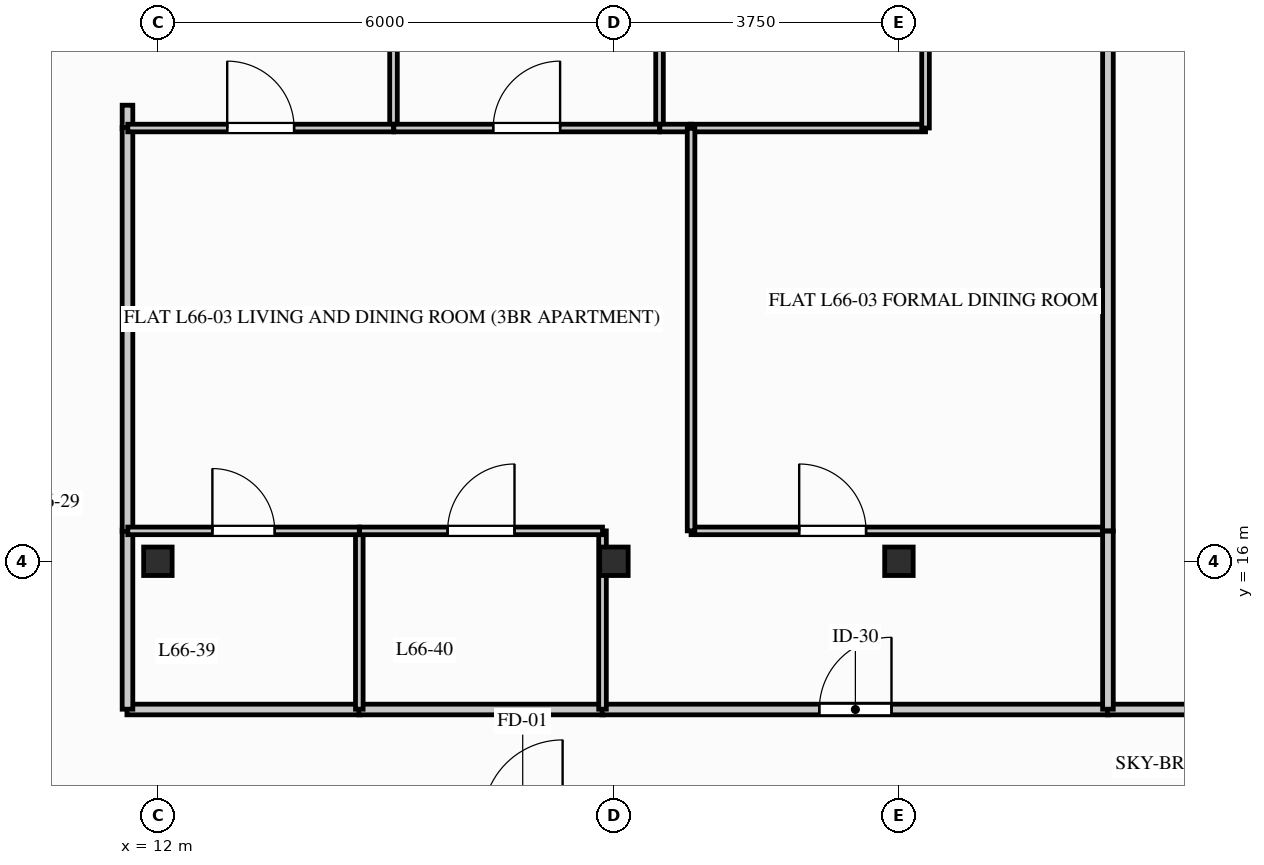
"""IFC4 building model, lengths in metres.
Left out: names, types, materials, properties, quantities, classifications, styles, units other than length and angle.
Written with IfcOpenShell. Run it as: python <this file> out.ifc"""

import sys

from ifc_helpers import new_model, si_unit, direction, frame, frame_2d, origin, origin_2d, place, context, subcontext, project, spatial, rectangle, i_section, extrude, element, fill, save


model = new_model("IFC4")
c1 = context("Model", 3, precision=1e-05, world=origin(), true_north=direction((0.0, 1.0)))
c2 = subcontext(c1, "Body", "Model", "MODEL_VIEW")
j1 = project(units=[si_unit("LENGTHUNIT", "METRE"), si_unit("PLANEANGLEUNIT", "RADIAN")], contexts=[c1])
p1 = place(None, origin())
s1 = spatial("IfcSite", under=j1, at=p1, CompositionType="ELEMENT")
p2 = place(p1, origin())
s2 = spatial("IfcBuilding", under=s1, at=p2, CompositionType="ELEMENT")
p3 = place(p2, frame((0.0, 0.0, 218.0)))
s3 = spatial("IfcBuildingStorey", under=s2, at=p3, CompositionType="ELEMENT", Elevation=218.0)
for number, where, z_axis, x_axis in (
    (1, (12.0, 16.0, 0.0), (0.0, 0.0, 1.0), (1.0, 0.0, 0.0)),
    (2, (18.0, 16.0, 0.0), (0.0, 0.0, 1.0), (1.0, 0.0, 0.0)),
    (3, (21.75, 16.0, 0.0), (0.0, 0.0, 1.0), (1.0, 0.0, 0.0)),
):
    element("IfcColumn", number, at=place(p3, frame(where, z_axis=z_axis, x_axis=x_axis)), inside=s3, PredefinedType="COLUMN", context=c2, shape_type="SweptSolid", body=[
        extrude(i_section(OverallWidth=0.375, OverallDepth=0.375, WebThickness=0.017, FlangeThickness=0.027, FilletRadius=0.015, at=origin_2d()), origin(), (0.0, 0.0, 1.0), 3.1),
    ])
p4 = place(p3, frame((11.593, 14.05, 0.0), z_axis=(0.0, 0.0, 1.0), x_axis=(1.0, 0.0, 0.0)))
e4 = element("IfcWall", 4, at=p4, inside=s3, PredefinedType="PARTITIONING", context=c2, shape_type="SweptSolid", body=[
    extrude(rectangle(XDim=3.069, YDim=0.14, at=frame_2d((1.534, 0.0))), origin(), (0.0, 0.0, 1.0), 2.325),
])
p5 = place(p3, frame((14.643, 14.05, 0.0), z_axis=(0.0, 0.0, 1.0), x_axis=(1.0, 0.0, 0.0)))
e5 = element("IfcWall", 5, at=p5, inside=s3, PredefinedType="PARTITIONING", context=c2, shape_type="SweptSolid", body=[
    extrude(rectangle(XDim=3.219, YDim=0.14, at=frame_2d((1.609, 0.0))), origin(), (0.0, 0.0, 1.0), 2.89),
])
p6 = place(p3, frame((17.843, 14.05, 0.0), z_axis=(0.0, 0.0, 1.0), x_axis=(1.0, 0.0, 0.0)))
e6 = element("IfcWall", 6, at=p6, inside=s3, PredefinedType="PARTITIONING", context=c2, shape_type="SweptSolid", body=[
    extrude(rectangle(XDim=6.668, YDim=0.14, at=frame_2d((3.334, 0.0))), origin(), (0.0, 0.0, 1.0), 2.325),
])
p7 = place(p6, frame((2.859, 0.0, 0.0)))
e7 = element("IfcOpeningElement", 7, at=p7, cuts=e6, PredefinedType="OPENING", context=c2, shape_type="SweptSolid", body=[
    extrude(rectangle(XDim=0.95, YDim=2.05, at=frame_2d((0.475, 1.025))), frame((0.0, 0.08, 0.0), z_axis=(0.0, -1.0, 0.0), x_axis=(1.0, 0.0, 0.0)), (0.0, 0.0, 1.0), 0.16),
])
p8 = place(p3, frame((24.493, 14.05, 0.0), z_axis=(0.0, 0.0, 1.0), x_axis=(1.0, 0.0, 0.0)))
e8 = element("IfcWall", 8, at=p8, inside=s3, PredefinedType="PARTITIONING", context=c2, shape_type="SweptSolid", body=[
    extrude(rectangle(XDim=11.019, YDim=0.14, at=frame_2d((5.509, 0.0))), origin(), (0.0, 0.0, 1.0), 2.332),
])
p9 = place(p8, frame((4.984, 0.0, 0.0)))
e9 = element("IfcOpeningElement", 9, at=p9, cuts=e8, PredefinedType="OPENING", context=c2, shape_type="SweptSolid", body=[
    extrude(rectangle(XDim=1.05, YDim=2.06, at=frame_2d((0.525, 1.03))), frame((0.0, 0.08, 0.0), z_axis=(0.0, -1.0, 0.0), x_axis=(1.0, 0.0, 0.0)), (0.0, 0.0, 1.0), 0.16),
])
p10 = place(p3, frame((11.6, 14.054, 0.0), z_axis=(0.0, 0.0, 1.0), x_axis=(0.0, 1.0, 0.0)))
e10 = element("IfcWall", 10, at=p10, inside=s3, PredefinedType="PARTITIONING", context=c2, shape_type="SweptSolid", body=[
    extrude(rectangle(XDim=2.357, YDim=0.14, at=frame_2d((1.179, 0.0))), origin(), (0.0, 0.0, 1.0), 2.325),
])
p11 = place(p3, frame((11.6, 21.689, 0.0), z_axis=(0.0, 0.0, 1.0), x_axis=(0.0, 1.0, 0.0)))
e11 = element("IfcWall", 11, at=p11, inside=s3, PredefinedType="PARTITIONING", context=c2, shape_type="SweptSolid", body=[
    extrude(rectangle(XDim=0.311, YDim=0.14, at=frame_2d((0.156, 0.0))), origin(), (0.0, 0.0, 1.0), 2.89),
])
p12 = place(p3, frame((11.6, 16.393, 0.0), z_axis=(0.0, 0.0, 1.0), x_axis=(0.0, 1.0, 0.0)))
e12 = element("IfcWall", 12, at=p12, inside=s3, PredefinedType="PARTITIONING", context=c2, shape_type="SweptSolid", body=[
    extrude(rectangle(XDim=5.315, YDim=0.14, at=frame_2d((2.657, 0.0))), origin(), (0.0, 0.0, 1.0), 2.614),
])
p13 = place(p3, frame((14.65, 14.054, 0.0), z_axis=(0.0, 0.0, 1.0), x_axis=(0.0, 1.0, 0.0)))
e13 = element("IfcWall", 13, at=p13, inside=s3, PredefinedType="PARTITIONING", context=c2, shape_type="SweptSolid", body=[
    extrude(rectangle(XDim=2.346, YDim=0.1, at=frame_2d((1.173, 0.0))), origin(), (0.0, 0.0, 1.0), 2.325),
])
p14 = place(p3, frame((11.604, 16.4, 0.0), z_axis=(0.0, 0.0, 1.0), x_axis=(1.0, 0.0, 0.0)))
e14 = element("IfcWall", 14, at=p14, inside=s3, PredefinedType="PARTITIONING", context=c2, shape_type="SweptSolid", body=[
    extrude(rectangle(XDim=3.046, YDim=0.1, at=frame_2d((1.523, 0.0))), origin(), (0.0, 0.0, 1.0), 2.325),
])
p15 = place(p14, frame((1.113, 0.0, 0.0)))
e15 = element("IfcOpeningElement", 15, at=p15, cuts=e14, PredefinedType="OPENING", context=c2, shape_type="SweptSolid", body=[
    extrude(rectangle(XDim=0.82, YDim=2.02, at=frame_2d((0.41, 1.01))), frame((0.0, 0.06, 0.0), z_axis=(0.0, -1.0, 0.0), x_axis=(1.0, 0.0, 0.0)), (0.0, 0.0, 1.0), 0.12),
])
p16 = place(p3, frame((17.85, 14.054, 0.0), z_axis=(0.0, 0.0, 1.0), x_axis=(0.0, 1.0, 0.0)))
e16 = element("IfcWall", 16, at=p16, inside=s3, PredefinedType="PARTITIONING", context=c2, shape_type="SweptSolid", body=[
    extrude(rectangle(XDim=2.346, YDim=0.1, at=frame_2d((1.173, 0.0))), origin(), (0.0, 0.0, 1.0), 2.325),
])
p17 = place(p3, frame((14.654, 16.4, 0.0), z_axis=(0.0, 0.0, 1.0), x_axis=(1.0, 0.0, 0.0)))
e17 = element("IfcWall", 17, at=p17, inside=s3, PredefinedType="PARTITIONING", context=c2, shape_type="SweptSolid", body=[
    extrude(rectangle(XDim=3.196, YDim=0.1, at=frame_2d((1.598, 0.0))), origin(), (0.0, 0.0, 1.0), 2.89),
])
p18 = place(p17, frame((1.158, 0.0, 0.0)))
e18 = element("IfcOpeningElement", 18, at=p18, cuts=e17, PredefinedType="OPENING", context=c2, shape_type="SweptSolid", body=[
    extrude(rectangle(XDim=0.88, YDim=2.04, at=frame_2d((0.44, 1.02))), frame((0.0, 0.06, 0.0), z_axis=(0.0, -1.0, 0.0), x_axis=(1.0, 0.0, 0.0)), (0.0, 0.0, 1.0), 0.12),
])
p19 = place(p3, frame((15.1, 21.7, 0.0), z_axis=(0.0, 0.0, 1.0), x_axis=(0.0, 1.0, 0.0)))
e19 = element("IfcWall", 19, at=p19, inside=s3, PredefinedType="PARTITIONING", context=c2, shape_type="SweptSolid", body=[
    extrude(rectangle(XDim=4.6, YDim=0.1, at=frame_2d((2.3, 0.0))), origin(), (0.0, 0.0, 1.0), 2.325),
])
p20 = place(p3, frame((11.604, 21.7, 0.0), z_axis=(0.0, 0.0, 1.0), x_axis=(1.0, 0.0, 0.0)))
e20 = element("IfcWall", 20, at=p20, inside=s3, PredefinedType="PARTITIONING", context=c2, shape_type="SweptSolid", body=[
    extrude(rectangle(XDim=3.496, YDim=0.1, at=frame_2d((1.748, 0.0))), origin(), (0.0, 0.0, 1.0), 2.325),
])
p21 = place(p20, frame((1.308, 0.0, 0.0)))
e21 = element("IfcOpeningElement", 21, at=p21, cuts=e20, PredefinedType="OPENING", context=c2, shape_type="SweptSolid", body=[
    extrude(rectangle(XDim=0.88, YDim=2.04, at=frame_2d((0.44, 1.02))), frame((0.0, 0.06, 0.0), z_axis=(0.0, -1.0, 0.0), x_axis=(1.0, 0.0, 0.0)), (0.0, 0.0, 1.0), 0.12),
])
p22 = place(p3, frame((18.6, 21.7, 0.0), z_axis=(0.0, 0.0, 1.0), x_axis=(0.0, 1.0, 0.0)))
e22 = element("IfcWall", 22, at=p22, inside=s3, PredefinedType="PARTITIONING", context=c2, shape_type="SweptSolid", body=[
    extrude(rectangle(XDim=4.6, YDim=0.1, at=frame_2d((2.3, 0.0))), origin(), (0.0, 0.0, 1.0), 2.325),
])
p23 = place(p22, frame((2.33, 0.0, 0.0)))
e23 = element("IfcOpeningElement", 23, at=p23, cuts=e22, PredefinedType="OPENING", context=c2, shape_type="SweptSolid", body=[
    extrude(rectangle(XDim=0.82, YDim=2.02, at=frame_2d((0.41, 1.01))), frame((0.0, 0.06, 0.0), z_axis=(0.0, -1.0, 0.0), x_axis=(1.0, 0.0, 0.0)), (0.0, 0.0, 1.0), 0.12),
])
p24 = place(p3, frame((15.104, 21.7, 0.0), z_axis=(0.0, 0.0, 1.0), x_axis=(1.0, 0.0, 0.0)))
e24 = element("IfcWall", 24, at=p24, inside=s3, PredefinedType="PARTITIONING", context=c2, shape_type="SweptSolid", body=[
    extrude(rectangle(XDim=3.496, YDim=0.1, at=frame_2d((1.748, 0.0))), origin(), (0.0, 0.0, 1.0), 2.325),
])
p25 = place(p24, frame((1.308, 0.0, 0.0)))
e25 = element("IfcOpeningElement", 25, at=p25, cuts=e24, PredefinedType="OPENING", context=c2, shape_type="SweptSolid", body=[
    extrude(rectangle(XDim=0.88, YDim=2.04, at=frame_2d((0.44, 1.02))), frame((0.0, 0.06, 0.0), z_axis=(0.0, -1.0, 0.0), x_axis=(1.0, 0.0, 0.0)), (0.0, 0.0, 1.0), 0.12),
])
p26 = place(p3, frame((19.004, 21.7, 0.0), z_axis=(0.0, 0.0, 1.0), x_axis=(1.0, 0.0, 0.0)))
e26 = element("IfcWall", 26, at=p26, inside=s3, PredefinedType="PARTITIONING", context=c2, shape_type="SweptSolid", body=[
    extrude(rectangle(XDim=3.096, YDim=0.1, at=frame_2d((1.548, 0.0))), origin(), (0.0, 0.0, 1.0), 2.325),
])
p27 = place(p3, frame((22.1, 21.7, 0.0), z_axis=(0.0, 0.0, 1.0), x_axis=(0.0, 1.0, 0.0)))
e27 = element("IfcWall", 27, at=p27, inside=s3, PredefinedType="PARTITIONING", context=c2, shape_type="SweptSolid", body=[
    extrude(rectangle(XDim=4.6, YDim=0.1, at=frame_2d((2.3, 0.0))), origin(), (0.0, 0.0, 1.0), 2.325),
])
p28 = place(p3, frame((18.604, 21.7, 0.0), z_axis=(0.0, 0.0, 1.0), x_axis=(1.0, 0.0, 0.0)))
e28 = element("IfcWall", 28, at=p28, inside=s3, PredefinedType="PARTITIONING", context=c2, shape_type="SweptSolid", body=[
    extrude(rectangle(XDim=0.418, YDim=0.1, at=frame_2d((0.209, 0.0))), origin(), (0.0, 0.0, 1.0), 2.89),
])
p29 = place(p3, frame((19.015, 16.4, 0.0), z_axis=(0.0, 0.0, 1.0), x_axis=(1.0, 0.0, 0.0)))
e29 = element("IfcWall", 29, at=p29, inside=s3, PredefinedType="PARTITIONING", context=c2, shape_type="SweptSolid", body=[
    extrude(rectangle(XDim=5.485, YDim=0.1, at=frame_2d((2.743, 0.0))), origin(), (0.0, 0.0, 1.0), 2.325),
])
p30 = place(p29, frame((1.423, 0.0, 0.0)))
e30 = element("IfcOpeningElement", 30, at=p30, cuts=e29, PredefinedType="OPENING", context=c2, shape_type="SweptSolid", body=[
    extrude(rectangle(XDim=0.88, YDim=2.04, at=frame_2d((0.44, 1.02))), frame((0.0, 0.06, 0.0), z_axis=(0.0, -1.0, 0.0), x_axis=(1.0, 0.0, 0.0)), (0.0, 0.0, 1.0), 0.12),
])
p31 = place(p3, frame((19.015, 16.4, 0.0), z_axis=(0.0, 0.0, 1.0), x_axis=(0.0, 1.0, 0.0)))
e31 = element("IfcWall", 31, at=p31, inside=s3, PredefinedType="PARTITIONING", context=c2, shape_type="SweptSolid", body=[
    extrude(rectangle(XDim=5.296, YDim=0.1, at=frame_2d((2.648, 0.0))), origin(), (0.0, 0.0, 1.0), 2.614),
])
p32 = place(p3, frame((24.5, 16.4, 0.0), z_axis=(0.0, 0.0, 1.0), x_axis=(0.0, 1.0, 0.0)))
e32 = element("IfcWall", 32, at=p32, inside=s3, PredefinedType="PARTITIONING", context=c2, shape_type="SweptSolid", body=[
    extrude(rectangle(XDim=7.111, YDim=0.14, at=frame_2d((3.556, 0.0))), origin(), (0.0, 0.0, 1.0), 2.325),
])
p33 = place(p3, frame((24.5, 14.054, 0.0), z_axis=(0.0, 0.0, 1.0), x_axis=(0.0, 1.0, 0.0)))
e33 = element("IfcWall", 33, at=p33, inside=s3, PredefinedType="PARTITIONING", context=c2, shape_type="SweptSolid", body=[
    extrude(rectangle(XDim=2.342, YDim=0.14, at=frame_2d((1.171, 0.0))), origin(), (0.0, 0.0, 1.0), 2.325),
])
p34 = place(p7, origin())
e34 = element("IfcDoor", 34, at=p34, inside=s3, OperationType="SINGLE_SWING_RIGHT", PredefinedType="DOOR", context=c2, shape_type="SweptSolid", body=[
    extrude(rectangle(XDim=0.95, YDim=2.05, at=frame_2d((0.475, 1.025))), frame((0.0, 0.025, 0.0), z_axis=(0.0, -1.0, 0.0), x_axis=(1.0, 0.0, 0.0)), (0.0, 0.0, 1.0), 0.05),
])
fill(e7, e34)
p35 = place(p15, origin())
e35 = element("IfcDoor", 35, at=p35, inside=s3, OperationType="SINGLE_SWING_LEFT", PredefinedType="DOOR", context=c2, shape_type="SweptSolid", body=[
    extrude(rectangle(XDim=0.82, YDim=2.02, at=frame_2d((0.41, 1.01))), frame((0.0, 0.025, 0.0), z_axis=(0.0, -1.0, 0.0), x_axis=(1.0, 0.0, 0.0)), (0.0, 0.0, 1.0), 0.05),
])
fill(e15, e35)
p36 = place(p18, origin())
e36 = element("IfcDoor", 36, at=p36, inside=s3, OperationType="SINGLE_SWING_RIGHT", PredefinedType="DOOR", context=c2, shape_type="SweptSolid", body=[
    extrude(rectangle(XDim=0.88, YDim=2.04, at=frame_2d((0.44, 1.02))), frame((0.0, 0.025, 0.0), z_axis=(0.0, -1.0, 0.0), x_axis=(1.0, 0.0, 0.0)), (0.0, 0.0, 1.0), 0.05),
])
fill(e18, e36)
p37 = place(p21, origin())
e37 = element("IfcDoor", 37, at=p37, inside=s3, OperationType="SINGLE_SWING_LEFT", PredefinedType="DOOR", context=c2, shape_type="SweptSolid", body=[
    extrude(rectangle(XDim=0.88, YDim=2.04, at=frame_2d((0.44, 1.02))), frame((0.0, 0.025, 0.0), z_axis=(0.0, -1.0, 0.0), x_axis=(1.0, 0.0, 0.0)), (0.0, 0.0, 1.0), 0.05),
])
fill(e21, e37)
p38 = place(p25, origin())
e38 = element("IfcDoor", 38, at=p38, inside=s3, OperationType="SINGLE_SWING_RIGHT", PredefinedType="DOOR", context=c2, shape_type="SweptSolid", body=[
    extrude(rectangle(XDim=0.88, YDim=2.04, at=frame_2d((0.44, 1.02))), frame((0.0, 0.025, 0.0), z_axis=(0.0, -1.0, 0.0), x_axis=(1.0, 0.0, 0.0)), (0.0, 0.0, 1.0), 0.05),
])
fill(e25, e38)
p39 = place(p30, origin())
e39 = element("IfcDoor", 39, at=p39, inside=s3, OperationType="SINGLE_SWING_LEFT", PredefinedType="DOOR", context=c2, shape_type="SweptSolid", body=[
    extrude(rectangle(XDim=0.88, YDim=2.04, at=frame_2d((0.44, 1.02))), frame((0.0, 0.025, 0.0), z_axis=(0.0, -1.0, 0.0), x_axis=(1.0, 0.0, 0.0)), (0.0, 0.0, 1.0), 0.05),
])
fill(e30, e39)
save(model, sys.argv[1])
